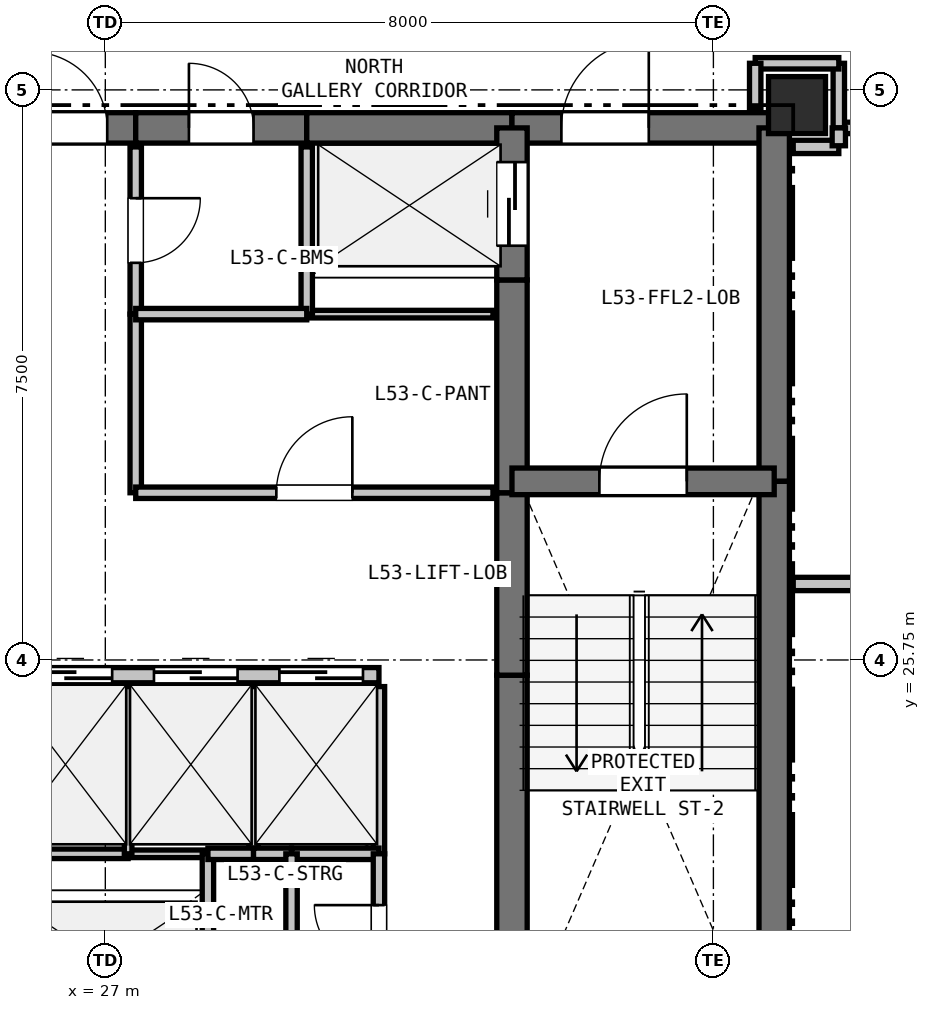
"""IFC4 building model, lengths in metres.
Left out: names, types, materials, properties, quantities, classifications, styles, units other than length and angle.
Written with IfcOpenShell. Run it as: python <this file> out.ifc"""

import sys

from ifc_helpers import new_model, si_unit, direction, frame, frame_2d, origin, origin_2d, place, context, subcontext, project, spatial, rectangle, extrude, element, fill, save


model = new_model("IFC4")
c1 = context("Model", 3, precision=1e-05, world=origin(), true_north=direction((0.0, 1.0)))
c2 = subcontext(c1, "Body", "Model", "MODEL_VIEW")
j1 = project(units=[si_unit("LENGTHUNIT", "METRE"), si_unit("PLANEANGLEUNIT", "RADIAN")], contexts=[c1])
p1 = place(None, origin())
s1 = spatial("IfcSite", under=j1, at=p1, CompositionType="ELEMENT")
p2 = place(p1, origin())
s2 = spatial("IfcBuilding", under=s1, at=p2, CompositionType="ELEMENT")
p3 = place(p2, frame((0.0, 0.0, 192.0)))
s3 = spatial("IfcBuildingStorey", under=s2, at=p3, CompositionType="ELEMENT", Elevation=192.0)
p4 = place(p3, frame((36.1, 33.05, 0.0), z_axis=(0.0, 0.0, 1.0), x_axis=(1.0, 0.0, 0.0)))
e1 = element("IfcColumn", 1, at=p4, inside=s3, PredefinedType="COLUMN", context=c2, shape_type="SweptSolid", body=[
    extrude(rectangle(XDim=0.75, YDim=0.75, at=origin_2d()), origin(), (0.0, 0.0, 1.0), 3.3),
])
p5 = place(p3, frame((25.65, 32.75, 0.0), z_axis=(0.0, 0.0, 1.0), x_axis=(1.0, 0.0, 0.0)))
e2 = element("IfcWall", 2, at=p5, inside=s3, PredefinedType="SHEAR", context=c2, shape_type="SweptSolid", body=[
    extrude(rectangle(XDim=1.75, YDim=0.4, at=frame_2d((0.875, 0.0))), origin(), (0.0, 0.0, 1.0), 3.07),
])
p6 = place(p5, frame((0.375, 0.0, 0.0)))
e3 = element("IfcOpeningElement", 3, at=p6, cuts=e2, PredefinedType="OPENING", context=c2, shape_type="SweptSolid", body=[
    extrude(rectangle(XDim=1.0, YDim=2.15, at=frame_2d((0.5, 1.075))), frame((0.0, 0.21, 0.0), z_axis=(0.0, -1.0, 0.0), x_axis=(1.0, 0.0, 0.0)), (0.0, 0.0, 1.0), 0.42),
])
p7 = place(p3, frame((27.4, 32.75, 0.0), z_axis=(0.0, 0.0, 1.0), x_axis=(1.0, 0.0, 0.0)))
e4 = element("IfcWall", 4, at=p7, inside=s3, PredefinedType="SHEAR", context=c2, shape_type="SweptSolid", body=[
    extrude(rectangle(XDim=2.25, YDim=0.4, at=frame_2d((1.125, 0.0))), origin(), (0.0, 0.0, 1.0), 3.07),
])
p8 = place(p7, frame((0.7, 0.0, 0.0)))
e5 = element("IfcOpeningElement", 5, at=p8, cuts=e4, PredefinedType="OPENING", context=c2, shape_type="SweptSolid", body=[
    extrude(rectangle(XDim=0.85, YDim=2.1, at=frame_2d((0.425, 1.05))), frame((0.0, 0.21, 0.0), z_axis=(0.0, -1.0, 0.0), x_axis=(1.0, 0.0, 0.0)), (0.0, 0.0, 1.0), 0.42),
])
p9 = place(p3, frame((29.65, 32.75, 0.0), z_axis=(0.0, 0.0, 1.0), x_axis=(1.0, 0.0, 0.0)))
e6 = element("IfcWall", 6, at=p9, inside=s3, PredefinedType="SHEAR", context=c2, shape_type="SweptSolid", body=[
    extrude(rectangle(XDim=2.7, YDim=0.4, at=frame_2d((1.35, 0.0))), origin(), (0.0, 0.0, 1.0), 3.07),
])
p10 = place(p3, frame((32.35, 32.75, 0.0), z_axis=(0.0, 0.0, 1.0), x_axis=(1.0, 0.0, 0.0)))
e7 = element("IfcWall", 7, at=p10, inside=s3, PredefinedType="SHEAR", context=c2, shape_type="SweptSolid", body=[
    extrude(rectangle(XDim=3.45, YDim=0.4, at=frame_2d((1.725, 0.0))), origin(), (0.0, 0.0, 1.0), 3.07),
])
p11 = place(p10, frame((0.65, 0.0, 0.0)))
e8 = element("IfcOpeningElement", 8, at=p11, cuts=e7, PredefinedType="OPENING", context=c2, shape_type="SweptSolid", body=[
    extrude(rectangle(XDim=1.15, YDim=2.15, at=frame_2d((0.575, 1.075))), frame((0.0, 0.21, 0.0), z_axis=(0.0, -1.0, 0.0), x_axis=(1.0, 0.0, 0.0)), (0.0, 0.0, 1.0), 0.42),
])
p12 = place(p3, frame((35.8, 32.75, 0.0), z_axis=(0.0, 0.0, 1.0), x_axis=(0.0, -1.0, 0.0)))
e9 = element("IfcWall", 9, at=p12, inside=s3, PredefinedType="SHEAR", context=c2, shape_type="SweptSolid", body=[
    extrude(rectangle(XDim=4.65, YDim=0.4, at=frame_2d((2.325, 0.0))), origin(), (0.0, 0.0, 1.0), 3.07),
])
p13 = place(p3, frame((35.8, 28.1, 0.0), z_axis=(0.0, 0.0, 1.0), x_axis=(0.0, -1.0, 0.0)))
e10 = element("IfcWall", 10, at=p13, inside=s3, PredefinedType="SHEAR", context=c2, shape_type="SweptSolid", body=[
    extrude(rectangle(XDim=7.35, YDim=0.4, at=frame_2d((3.675, 0.0))), origin(), (0.0, 0.0, 1.0), 3.07),
])
p14 = place(p3, frame((32.35, 20.75, 0.0), z_axis=(0.0, 0.0, 1.0), x_axis=(0.0, 1.0, 0.0)))
e11 = element("IfcWall", 11, at=p14, inside=s3, PredefinedType="SHEAR", context=c2, shape_type="SweptSolid", body=[
    extrude(rectangle(XDim=4.8, YDim=0.4, at=frame_2d((2.4, 0.0))), origin(), (0.0, 0.0, 1.0), 3.07),
])
p15 = place(p3, frame((32.35, 25.55, 0.0), z_axis=(0.0, 0.0, 1.0), x_axis=(0.0, 1.0, 0.0)))
e12 = element("IfcWall", 12, at=p15, inside=s3, PredefinedType="SHEAR", context=c2, shape_type="SweptSolid", body=[
    extrude(rectangle(XDim=2.4, YDim=0.4, at=frame_2d((1.2, 0.0))), origin(), (0.0, 0.0, 1.0), 3.07),
])
p16 = place(p3, frame((32.35, 27.95, 0.0), z_axis=(0.0, 0.0, 1.0), x_axis=(0.0, 1.0, 0.0)))
e13 = element("IfcWall", 13, at=p16, inside=s3, PredefinedType="SHEAR", context=c2, shape_type="SweptSolid", body=[
    extrude(rectangle(XDim=2.8, YDim=0.4, at=frame_2d((1.4, 0.0))), origin(), (0.0, 0.0, 1.0), 3.07),
])
p17 = place(p3, frame((32.35, 30.75, 0.0), z_axis=(0.0, 0.0, 1.0), x_axis=(0.0, 1.0, 0.0)))
e14 = element("IfcWall", 14, at=p17, inside=s3, PredefinedType="SHEAR", context=c2, shape_type="SweptSolid", body=[
    extrude(rectangle(XDim=2.0, YDim=0.4, at=frame_2d((1.0, 0.0))), origin(), (0.0, 0.0, 1.0), 3.07),
])
p18 = place(p17, frame((0.45, 0.0, 0.0)))
e15 = element("IfcOpeningElement", 15, at=p18, cuts=e14, PredefinedType="OPENING", context=c2, shape_type="SweptSolid", body=[
    extrude(rectangle(XDim=1.1, YDim=2.15, at=frame_2d((0.55, 1.075))), frame((0.0, 0.21, 0.0), z_axis=(0.0, -1.0, 0.0), x_axis=(1.0, 0.0, 0.0)), (0.0, 0.0, 1.0), 0.42),
])
p19 = place(p3, frame((32.35, 28.1, 0.0), z_axis=(0.0, 0.0, 1.0), x_axis=(1.0, 0.0, 0.0)))
e16 = element("IfcWall", 16, at=p19, inside=s3, PredefinedType="SHEAR", context=c2, shape_type="SweptSolid", body=[
    extrude(rectangle(XDim=3.45, YDim=0.35, at=frame_2d((1.725, 0.0))), origin(), (0.0, 0.0, 1.0), 3.07),
])
p20 = place(p19, frame((1.15, 0.0, 0.0)))
e17 = element("IfcOpeningElement", 17, at=p20, cuts=e16, PredefinedType="OPENING", context=c2, shape_type="SweptSolid", body=[
    extrude(rectangle(XDim=1.15, YDim=2.15, at=frame_2d((0.575, 1.075))), frame((0.0, 0.185, 0.0), z_axis=(0.0, -1.0, 0.0), x_axis=(1.0, 0.0, 0.0)), (0.0, 0.0, 1.0), 0.37),
])
p21 = place(p3, frame((25.65, 25.55, 0.0), z_axis=(0.0, 0.0, 1.0), x_axis=(1.0, 0.0, 0.0)))
e18 = element("IfcWall", 18, at=p21, inside=s3, PredefinedType="PARTITIONING", context=c2, shape_type="SweptSolid", body=[
    extrude(rectangle(XDim=4.95, YDim=0.2, at=frame_2d((2.475, 0.0))), origin(), (0.0, 0.0, 1.0), 3.07),
])
p22 = place(p21, frame((0.34, 0.0, 0.0)))
e19 = element("IfcOpeningElement", 19, at=p22, cuts=e18, PredefinedType="OPENING", context=c2, shape_type="SweptSolid", body=[
    extrude(rectangle(XDim=1.1, YDim=2.15, at=frame_2d((0.55, 1.075))), frame((0.0, 0.11, 0.0), z_axis=(0.0, -1.0, 0.0), x_axis=(1.0, 0.0, 0.0)), (0.0, 0.0, 1.0), 0.22),
])
p23 = place(p21, frame((1.99, 0.0, 0.0)))
e20 = element("IfcOpeningElement", 20, at=p23, cuts=e18, PredefinedType="OPENING", context=c2, shape_type="SweptSolid", body=[
    extrude(rectangle(XDim=1.1, YDim=2.15, at=frame_2d((0.55, 1.075))), frame((0.0, 0.11, 0.0), z_axis=(0.0, -1.0, 0.0), x_axis=(1.0, 0.0, 0.0)), (0.0, 0.0, 1.0), 0.22),
])
p24 = place(p21, frame((3.64, 0.0, 0.0)))
e21 = element("IfcOpeningElement", 21, at=p24, cuts=e18, PredefinedType="OPENING", context=c2, shape_type="SweptSolid", body=[
    extrude(rectangle(XDim=1.1, YDim=2.15, at=frame_2d((0.55, 1.075))), frame((0.0, 0.11, 0.0), z_axis=(0.0, -1.0, 0.0), x_axis=(1.0, 0.0, 0.0)), (0.0, 0.0, 1.0), 0.22),
])
p25 = place(p3, frame((25.9, 23.2, 0.0), z_axis=(0.0, 0.0, 1.0), x_axis=(1.0, 0.0, 0.0)))
e22 = element("IfcWall", 22, at=p25, inside=s3, PredefinedType="PARTITIONING", context=c2, shape_type="SweptSolid", body=[
    extrude(rectangle(XDim=1.4, YDim=0.125, at=frame_2d((0.7, 0.0))), origin(), (0.0, 0.0, 1.0), 3.07),
])
p26 = place(p3, frame((27.3, 23.2, 0.0), z_axis=(0.0, 0.0, 1.0), x_axis=(1.0, 0.0, 0.0)))
e23 = element("IfcWall", 23, at=p26, inside=s3, PredefinedType="PARTITIONING", context=c2, shape_type="SweptSolid", body=[
    extrude(rectangle(XDim=1.05, YDim=0.1, at=frame_2d((0.525, 0.0))), origin(), (0.0, 0.0, 1.0), 3.07),
])
p27 = place(p3, frame((28.35, 23.2, 0.0), z_axis=(0.0, 0.0, 1.0), x_axis=(0.0, -1.0, 0.0)))
e24 = element("IfcWall", 24, at=p27, inside=s3, PredefinedType="PARTITIONING", context=c2, shape_type="SweptSolid", body=[
    extrude(rectangle(XDim=2.2, YDim=0.15, at=frame_2d((1.1, 0.0))), origin(), (0.0, 0.0, 1.0), 3.07),
])
p28 = place(p3, frame((32.1, 30.3, 0.0), z_axis=(0.0, 0.0, 1.0), x_axis=(-1.0, 0.0, 0.0)))
e25 = element("IfcWall", 25, at=p28, inside=s3, PredefinedType="PARTITIONING", context=c2, shape_type="SweptSolid", body=[
    extrude(rectangle(XDim=2.45, YDim=0.1, at=frame_2d((1.225, 0.0))), origin(), (0.0, 0.0, 1.0), 3.07),
])
p29 = place(p3, frame((29.65, 30.3, 0.0), z_axis=(0.0, 0.0, 1.0), x_axis=(0.0, 1.0, 0.0)))
e26 = element("IfcWall", 26, at=p29, inside=s3, PredefinedType="PARTITIONING", context=c2, shape_type="SweptSolid", body=[
    extrude(rectangle(XDim=2.2, YDim=0.15, at=frame_2d((1.1, 0.0))), origin(), (0.0, 0.0, 1.0), 3.07),
])
p30 = place(p3, frame((27.3, 25.4, 0.0), z_axis=(0.0, 0.0, 1.0), x_axis=(0.0, -1.0, 0.0)))
e27 = element("IfcWall", 27, at=p30, inside=s3, PredefinedType="PARTITIONING", context=c2, shape_type="SweptSolid", body=[
    extrude(rectangle(XDim=2.2, YDim=0.1, at=frame_2d((1.1, 0.0))), origin(), (0.0, 0.0, 1.0), 3.07),
])
p31 = place(p3, frame((28.95, 25.4, 0.0), z_axis=(0.0, 0.0, 1.0), x_axis=(0.0, -1.0, 0.0)))
e28 = element("IfcWall", 28, at=p31, inside=s3, PredefinedType="PARTITIONING", context=c2, shape_type="SweptSolid", body=[
    extrude(rectangle(XDim=2.2, YDim=0.125, at=frame_2d((1.1, 0.0))), origin(), (0.0, 0.0, 1.0), 3.07),
])
p32 = place(p3, frame((28.95, 23.2, 0.0), z_axis=(0.0, 0.0, 1.0), x_axis=(-1.0, 0.0, 0.0)))
e29 = element("IfcWall", 29, at=p32, inside=s3, PredefinedType="PARTITIONING", context=c2, shape_type="SweptSolid", body=[
    extrude(rectangle(XDim=0.6, YDim=0.15, at=frame_2d((0.3, 0.0))), origin(), (0.0, 0.0, 1.0), 3.07),
])
p33 = place(p3, frame((30.6, 25.4, 0.0), z_axis=(0.0, 0.0, 1.0), x_axis=(0.0, -1.0, 0.0)))
e30 = element("IfcWall", 30, at=p33, inside=s3, PredefinedType="PARTITIONING", context=c2, shape_type="SweptSolid", body=[
    extrude(rectangle(XDim=2.2, YDim=0.15, at=frame_2d((1.1, 0.0))), origin(), (0.0, 0.0, 1.0), 3.07),
])
p34 = place(p3, frame((30.6, 23.2, 0.0), z_axis=(0.0, 0.0, 1.0), x_axis=(-1.0, 0.0, 0.0)))
e31 = element("IfcWall", 31, at=p34, inside=s3, PredefinedType="PARTITIONING", context=c2, shape_type="SweptSolid", body=[
    extrude(rectangle(XDim=1.15, YDim=0.15, at=frame_2d((0.575, 0.0))), origin(), (0.0, 0.0, 1.0), 3.07),
])
p35 = place(p3, frame((29.45, 23.2, 0.0), z_axis=(0.0, 0.0, 1.0), x_axis=(-1.0, 0.0, 0.0)))
e32 = element("IfcWall", 32, at=p35, inside=s3, PredefinedType="PARTITIONING", context=c2, shape_type="SweptSolid", body=[
    extrude(rectangle(XDim=0.5, YDim=0.15, at=frame_2d((0.25, 0.0))), origin(), (0.0, 0.0, 1.0), 3.07),
])
p36 = place(p3, frame((30.6, 21.0, 0.0), z_axis=(0.0, 0.0, 1.0), x_axis=(0.0, 1.0, 0.0)))
e33 = element("IfcWall", 33, at=p36, inside=s3, PredefinedType="PARTITIONING", context=c2, shape_type="SweptSolid", body=[
    extrude(rectangle(XDim=2.2, YDim=0.15, at=frame_2d((1.1, 0.0))), origin(), (0.0, 0.0, 1.0), 3.07),
])
p37 = place(p36, frame((0.675, 0.0, 0.0)))
e34 = element("IfcOpeningElement", 34, at=p37, cuts=e33, PredefinedType="OPENING", context=c2, shape_type="SweptSolid", body=[
    extrude(rectangle(XDim=0.85, YDim=2.1, at=frame_2d((0.425, 1.05))), frame((0.0, 0.085, 0.0), z_axis=(0.0, -1.0, 0.0), x_axis=(1.0, 0.0, 0.0)), (0.0, 0.0, 1.0), 0.17),
])
p38 = place(p3, frame((27.4, 32.5, 0.0), z_axis=(0.0, 0.0, 1.0), x_axis=(0.0, -1.0, 0.0)))
e35 = element("IfcWall", 35, at=p38, inside=s3, PredefinedType="PARTITIONING", context=c2, shape_type="SweptSolid", body=[
    extrude(rectangle(XDim=2.2, YDim=0.15, at=frame_2d((1.1, 0.0))), origin(), (0.0, 0.0, 1.0), 3.07),
])
p39 = place(p38, frame((0.675, 0.0, 0.0)))
e36 = element("IfcOpeningElement", 36, at=p39, cuts=e35, PredefinedType="OPENING", context=c2, shape_type="SweptSolid", body=[
    extrude(rectangle(XDim=0.85, YDim=2.1, at=frame_2d((0.425, 1.05))), frame((0.0, 0.085, 0.0), z_axis=(0.0, -1.0, 0.0), x_axis=(1.0, 0.0, 0.0)), (0.0, 0.0, 1.0), 0.17),
])
p40 = place(p3, frame((27.4, 30.3, 0.0), z_axis=(0.0, 0.0, 1.0), x_axis=(0.0, -1.0, 0.0)))
e37 = element("IfcWall", 37, at=p40, inside=s3, PredefinedType="PARTITIONING", context=c2, shape_type="SweptSolid", body=[
    extrude(rectangle(XDim=2.35, YDim=0.15, at=frame_2d((1.175, 0.0))), origin(), (0.0, 0.0, 1.0), 3.07),
])
p41 = place(p3, frame((27.4, 27.95, 0.0), z_axis=(0.0, 0.0, 1.0), x_axis=(1.0, 0.0, 0.0)))
e38 = element("IfcWall", 38, at=p41, inside=s3, PredefinedType="PARTITIONING", context=c2, shape_type="SweptSolid", body=[
    extrude(rectangle(XDim=4.7, YDim=0.15, at=frame_2d((2.35, 0.0))), origin(), (0.0, 0.0, 1.0), 3.07),
])
p42 = place(p41, frame((1.85, 0.0, 0.0)))
e39 = element("IfcOpeningElement", 39, at=p42, cuts=e38, PredefinedType="OPENING", context=c2, shape_type="SweptSolid", body=[
    extrude(rectangle(XDim=1.0, YDim=2.15, at=frame_2d((0.5, 1.075))), frame((0.0, 0.085, 0.0), z_axis=(0.0, -1.0, 0.0), x_axis=(1.0, 0.0, 0.0)), (0.0, 0.0, 1.0), 0.17),
])
p43 = place(p3, frame((39.2, 32.75, 0.0), z_axis=(0.0, 0.0, 1.0), x_axis=(-1.0, 0.0, 0.0)))
e40 = element("IfcWall", 40, at=p43, inside=s3, PredefinedType="PARTITIONING", context=c2, shape_type="SweptSolid", body=[
    extrude(rectangle(XDim=2.55, YDim=0.15, at=frame_2d((1.275, 0.0))), origin(), (0.0, 0.0, 1.0), 3.07),
])
p44 = place(p43, frame((0.85, 0.0, 0.0)))
e41 = element("IfcOpeningElement", 41, at=p44, cuts=e40, PredefinedType="OPENING", context=c2, shape_type="SweptSolid", body=[
    extrude(rectangle(XDim=0.85, YDim=2.1, at=frame_2d((0.425, 1.05))), frame((0.0, 0.085, 0.0), z_axis=(0.0, -1.0, 0.0), x_axis=(1.0, 0.0, 0.0)), (0.0, 0.0, 1.0), 0.17),
])
p45 = place(p3, frame((36.65, 32.75, 0.0), z_axis=(0.0, 0.0, 1.0), x_axis=(0.0, 1.0, 0.0)))
e42 = element("IfcWall", 42, at=p45, inside=s3, PredefinedType="PARTITIONING", context=c2, shape_type="SweptSolid", body=[
    extrude(rectangle(XDim=0.85, YDim=0.15, at=frame_2d((0.425, 0.0))), origin(), (0.0, 0.0, 1.0), 2.518),
])
p46 = place(p3, frame((36.65, 33.6, 0.0), z_axis=(0.0, 0.0, 1.0), x_axis=(-1.0, 0.0, 0.0)))
e43 = element("IfcWall", 43, at=p46, inside=s3, PredefinedType="PARTITIONING", context=c2, shape_type="SweptSolid", body=[
    extrude(rectangle(XDim=1.1, YDim=0.15, at=frame_2d((0.55, 0.0))), origin(), (0.0, 0.0, 1.0), 2.518),
])
p47 = place(p3, frame((35.55, 33.6, 0.0), z_axis=(0.0, 0.0, 1.0), x_axis=(0.0, -1.0, 0.0)))
e44 = element("IfcWall", 44, at=p47, inside=s3, PredefinedType="PARTITIONING", context=c2, shape_type="SweptSolid", body=[
    extrude(rectangle(XDim=0.6, YDim=0.15, at=frame_2d((0.3, 0.0))), origin(), (0.0, 0.0, 1.0), 2.595),
])
p48 = place(p3, frame((36.05, 32.5, 0.0), z_axis=(0.0, 0.0, 1.0), x_axis=(1.0, 0.0, 0.0)))
e45 = element("IfcWall", 45, at=p48, inside=s3, PredefinedType="PLUMBINGWALL", context=c2, shape_type="SweptSolid", body=[
    extrude(rectangle(XDim=0.6, YDim=0.175, at=frame_2d((0.3, 0.0))), origin(), (0.0, 0.0, 1.0), 2.595),
])
p49 = place(p3, frame((36.65, 32.515, 0.0), z_axis=(0.0, 0.0, 1.0), x_axis=(0.0, 1.0, 0.0)))
e46 = element("IfcWall", 46, at=p49, inside=s3, PredefinedType="PLUMBINGWALL", context=c2, shape_type="SweptSolid", body=[
    extrude(rectangle(XDim=0.235, YDim=0.175, at=frame_2d((0.118, 0.0))), origin(), (0.0, 0.0, 1.0), 3.07),
])
p50 = place(p3, frame((40.55, 26.75, 0.0), z_axis=(0.0, 0.0, 1.0), x_axis=(-1.0, 0.0, 0.0)))
e47 = element("IfcWall", 47, at=p50, inside=s3, PredefinedType="PLUMBINGWALL", context=c2, shape_type="SweptSolid", body=[
    extrude(rectangle(XDim=4.5, YDim=0.175, at=frame_2d((2.25, 0.0))), origin(), (0.0, 0.0, 1.0), 2.365),
])
p51 = place(p3, frame((27.4, 30.3, 0.0), z_axis=(0.0, 0.0, 1.0), x_axis=(1.0, 0.0, 0.0)))
e48 = element("IfcWall", 48, at=p51, inside=s3, PredefinedType="PARTITIONING", context=c2, shape_type="SweptSolid", body=[
    extrude(rectangle(XDim=2.25, YDim=0.15, at=frame_2d((1.125, 0.0))), origin(), (0.0, 0.0, 1.0), 3.07),
])
p52 = place(p3, frame((29.45, 23.2, 0.0), z_axis=(0.0, 0.0, 1.0), x_axis=(0.0, -1.0, 0.0)))
e49 = element("IfcWall", 49, at=p52, inside=s3, PredefinedType="PARTITIONING", context=c2, shape_type="SweptSolid", body=[
    extrude(rectangle(XDim=2.2, YDim=0.15, at=frame_2d((1.1, 0.0))), origin(), (0.0, 0.0, 1.0), 3.07),
])
p53 = place(p22, origin())
e50 = element("IfcDoor", 50, at=p53, inside=s3, OperationType="SLIDING_TO_LEFT", PredefinedType="DOOR", context=c2, shape_type="SweptSolid", body=[
    extrude(rectangle(XDim=1.1, YDim=2.15, at=frame_2d((0.55, 1.075))), frame((0.0, 0.025, 0.0), z_axis=(0.0, -1.0, 0.0), x_axis=(1.0, 0.0, 0.0)), (0.0, 0.0, 1.0), 0.05),
])
fill(e19, e50)
p54 = place(p23, origin())
e51 = element("IfcDoor", 51, at=p54, inside=s3, OperationType="SLIDING_TO_LEFT", PredefinedType="DOOR", context=c2, shape_type="SweptSolid", body=[
    extrude(rectangle(XDim=1.1, YDim=2.15, at=frame_2d((0.55, 1.075))), frame((0.0, 0.025, 0.0), z_axis=(0.0, -1.0, 0.0), x_axis=(1.0, 0.0, 0.0)), (0.0, 0.0, 1.0), 0.05),
])
fill(e20, e51)
p55 = place(p24, origin())
e52 = element("IfcDoor", 52, at=p55, inside=s3, OperationType="SLIDING_TO_LEFT", PredefinedType="DOOR", context=c2, shape_type="SweptSolid", body=[
    extrude(rectangle(XDim=1.1, YDim=2.15, at=frame_2d((0.55, 1.075))), frame((0.0, 0.025, 0.0), z_axis=(0.0, -1.0, 0.0), x_axis=(1.0, 0.0, 0.0)), (0.0, 0.0, 1.0), 0.05),
])
fill(e21, e52)
p56 = place(p6, origin())
e53 = element("IfcDoor", 53, at=p56, inside=s3, OperationType="SINGLE_SWING_LEFT", PredefinedType="DOOR", context=c2, shape_type="SweptSolid", body=[
    extrude(rectangle(XDim=1.0, YDim=2.15, at=frame_2d((0.5, 1.075))), frame((0.0, 0.025, 0.0), z_axis=(0.0, -1.0, 0.0), x_axis=(1.0, 0.0, 0.0)), (0.0, 0.0, 1.0), 0.05),
])
fill(e3, e53)
p57 = place(p18, origin())
e54 = element("IfcDoor", 54, at=p57, inside=s3, OperationType="SLIDING_TO_LEFT", PredefinedType="DOOR", context=c2, shape_type="SweptSolid", body=[
    extrude(rectangle(XDim=1.1, YDim=2.15, at=frame_2d((0.55, 1.075))), frame((0.0, 0.025, 0.0), z_axis=(0.0, -1.0, 0.0), x_axis=(1.0, 0.0, 0.0)), (0.0, 0.0, 1.0), 0.05),
])
fill(e15, e54)
p58 = place(p20, origin())
e55 = element("IfcDoor", 55, at=p58, inside=s3, OperationType="SINGLE_SWING_RIGHT", PredefinedType="DOOR", context=c2, shape_type="SweptSolid", body=[
    extrude(rectangle(XDim=1.15, YDim=2.15, at=frame_2d((0.575, 1.075))), frame((0.0, 0.025, 0.0), z_axis=(0.0, -1.0, 0.0), x_axis=(1.0, 0.0, 0.0)), (0.0, 0.0, 1.0), 0.05),
])
fill(e17, e55)
p59 = place(p11, origin())
e56 = element("IfcDoor", 56, at=p59, inside=s3, OperationType="SINGLE_SWING_RIGHT", PredefinedType="DOOR", context=c2, shape_type="SweptSolid", body=[
    extrude(rectangle(XDim=1.15, YDim=2.15, at=frame_2d((0.575, 1.075))), frame((0.0, 0.025, 0.0), z_axis=(0.0, -1.0, 0.0), x_axis=(1.0, 0.0, 0.0)), (0.0, 0.0, 1.0), 0.05),
])
fill(e8, e56)
p60 = place(p42, origin())
e57 = element("IfcDoor", 57, at=p60, inside=s3, OperationType="SINGLE_SWING_RIGHT", PredefinedType="DOOR", context=c2, shape_type="SweptSolid", body=[
    extrude(rectangle(XDim=1.0, YDim=2.15, at=frame_2d((0.5, 1.075))), frame((0.0, 0.025, 0.0), z_axis=(0.0, -1.0, 0.0), x_axis=(1.0, 0.0, 0.0)), (0.0, 0.0, 1.0), 0.05),
])
fill(e39, e57)
p61 = place(p39, origin())
e58 = element("IfcDoor", 58, at=p61, inside=s3, OperationType="SINGLE_SWING_LEFT", PredefinedType="DOOR", context=c2, shape_type="SweptSolid", body=[
    extrude(rectangle(XDim=0.85, YDim=2.1, at=frame_2d((0.425, 1.05))), frame((0.0, 0.025, 0.0), z_axis=(0.0, -1.0, 0.0), x_axis=(1.0, 0.0, 0.0)), (0.0, 0.0, 1.0), 0.05),
])
fill(e36, e58)
p62 = place(p37, origin())
e59 = element("IfcDoor", 59, at=p62, inside=s3, OperationType="SINGLE_SWING_RIGHT", PredefinedType="DOOR", context=c2, shape_type="SweptSolid", body=[
    extrude(rectangle(XDim=0.85, YDim=2.1, at=frame_2d((0.425, 1.05))), frame((0.0, 0.025, 0.0), z_axis=(0.0, -1.0, 0.0), x_axis=(1.0, 0.0, 0.0)), (0.0, 0.0, 1.0), 0.05),
])
fill(e34, e59)
p63 = place(p8, origin())
e60 = element("IfcDoor", 60, at=p63, inside=s3, OperationType="SINGLE_SWING_LEFT", PredefinedType="DOOR", context=c2, shape_type="SweptSolid", body=[
    extrude(rectangle(XDim=0.85, YDim=2.1, at=frame_2d((0.425, 1.05))), frame((0.0, 0.025, 0.0), z_axis=(0.0, -1.0, 0.0), x_axis=(1.0, 0.0, 0.0)), (0.0, 0.0, 1.0), 0.05),
])
fill(e5, e60)
save(model, sys.argv[1])
